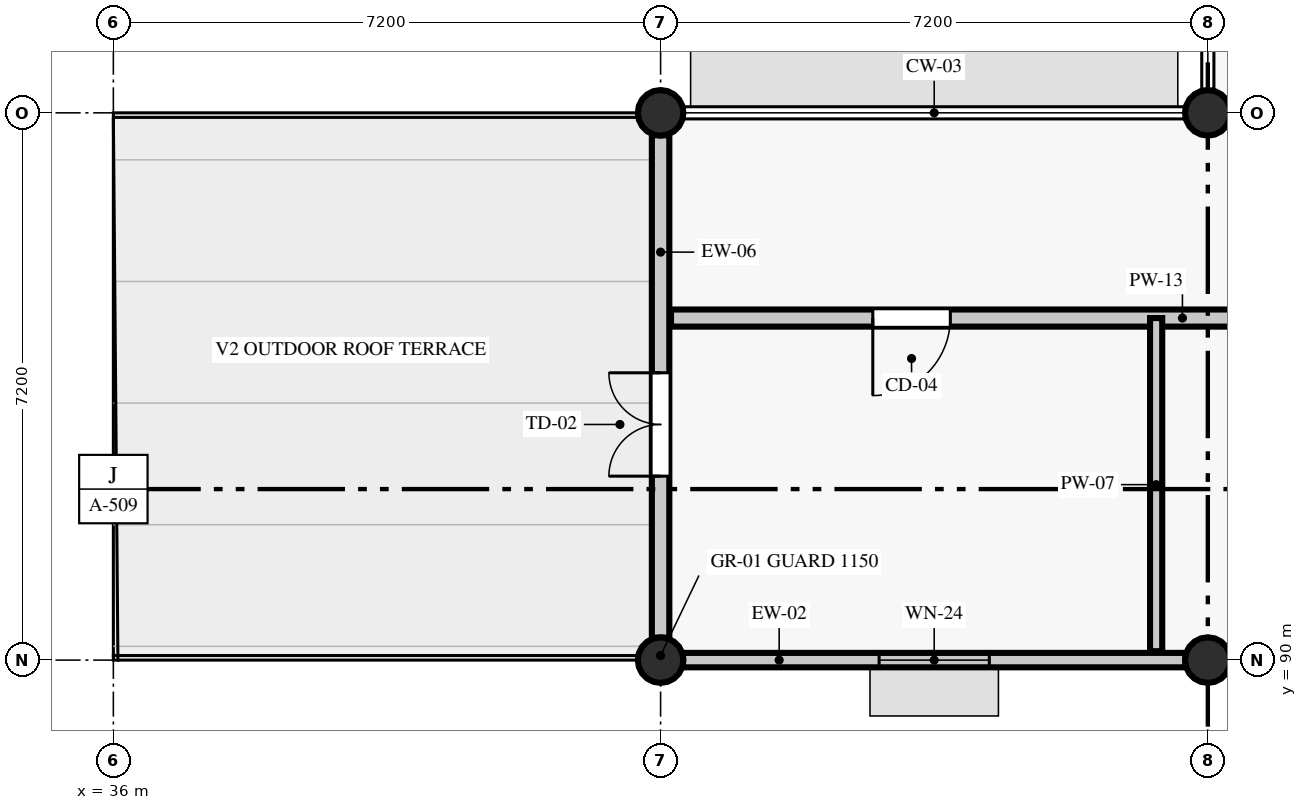
"""IFC4 building model, lengths in metres.
Left out: names, types, materials, properties, quantities, classifications, styles, units other than length and angle.
Written with IfcOpenShell. Run it as: python <this file> out.ifc"""

import sys

from ifc_helpers import new_model, si_unit, direction, frame, frame_2d, origin, origin_2d, place, context, subcontext, project, spatial, rectangle, circle, extrude, element, fill, save


model = new_model("IFC4")
c1 = context("Model", 3, precision=1e-05, world=origin(), true_north=direction((0.0, 1.0)))
c2 = subcontext(c1, "Body", "Model", "MODEL_VIEW")
j1 = project(units=[si_unit("LENGTHUNIT", "METRE"), si_unit("PLANEANGLEUNIT", "RADIAN")], contexts=[c1])
p1 = place(None, origin())
s1 = spatial("IfcSite", under=j1, at=p1, CompositionType="ELEMENT")
p2 = place(p1, origin())
s2 = spatial("IfcBuilding", under=s1, at=p2, CompositionType="ELEMENT")
p3 = place(p2, frame((0.0, 0.0, 9.6)))
s3 = spatial("IfcBuildingStorey", under=s2, at=p3, CompositionType="ELEMENT", Elevation=9.6)
for number, where, z_axis, x_axis in (
    (1, (43.2, 90.0, 0.0), (0.0, 0.0, 1.0), (1.0, 0.0, 0.0)),
    (2, (43.2, 97.2, 0.0), (0.0, 0.0, 1.0), (1.0, 0.0, 0.0)),
):
    element("IfcColumn", number, at=place(p3, frame(where, z_axis=z_axis, x_axis=x_axis)), inside=s3, PredefinedType="COLUMN", context=c2, shape_type="SweptSolid", body=[
        extrude(circle(Radius=0.3, at=origin_2d()), origin(), (0.0, 0.0, 1.0), 3.978),
    ])
for number, where, z_axis, x_axis in (
    (3, (50.4, 90.0, 0.0), (0.0, 0.0, 1.0), (1.0, 0.0, 0.0)),
    (4, (50.4, 97.2, 0.0), (0.0, 0.0, 1.0), (1.0, 0.0, 0.0)),
):
    element("IfcColumn", number, at=place(p3, frame(where, z_axis=z_axis, x_axis=x_axis)), inside=s3, PredefinedType="COLUMN", context=c2, shape_type="SweptSolid", body=[
        extrude(circle(Radius=0.3, at=origin_2d()), origin(), (0.0, 0.0, 1.0), 3.95),
    ])
p4 = place(p3, frame((43.495, 90.0, 0.0), z_axis=(0.0, 0.0, 1.0), x_axis=(1.0, 0.0, 0.0)))
e5 = element("IfcWall", 5, at=p4, inside=s3, PredefinedType="STANDARD", context=c2, shape_type="SweptSolid", body=[
    extrude(rectangle(XDim=6.61, YDim=0.19, at=frame_2d((3.305, 0.0))), origin(), (0.0, 0.0, 1.0), 3.328),
])
p5 = place(p4, frame((2.58, 0.0, 0.9)))
e6 = element("IfcOpeningElement", 6, at=p5, cuts=e5, PredefinedType="OPENING", context=c2, shape_type="SweptSolid", body=[
    extrude(rectangle(XDim=1.45, YDim=1.54, at=frame_2d((0.725, 0.77))), frame((0.0, 0.105, 0.0), z_axis=(0.0, -1.0, 0.0), x_axis=(1.0, 0.0, 0.0)), (0.0, 0.0, 1.0), 0.21),
])
p6 = place(p3, frame((43.2, 96.905, 0.0), z_axis=(0.0, 0.0, 1.0), x_axis=(0.0, -1.0, 0.0)))
e7 = element("IfcWall", 7, at=p6, inside=s3, PredefinedType="STANDARD", context=c2, shape_type="SweptSolid", body=[
    extrude(rectangle(XDim=6.61, YDim=0.23, at=frame_2d((3.305, 0.0))), origin(), (0.0, 0.0, 1.0), 3.328),
])
p7 = place(p6, frame((3.125, 0.0, 0.0)))
e8 = element("IfcOpeningElement", 8, at=p7, cuts=e7, PredefinedType="OPENING", context=c2, shape_type="SweptSolid", body=[
    extrude(rectangle(XDim=1.36, YDim=2.16, at=frame_2d((0.68, 1.08))), frame((0.0, 0.125, 0.0), z_axis=(0.0, -1.0, 0.0), x_axis=(1.0, 0.0, 0.0)), (0.0, 0.0, 1.0), 0.25),
])
p8 = place(p3, frame((43.337, 94.5, 0.0), z_axis=(0.0, 0.0, 1.0), x_axis=(1.0, 0.0, 0.0)))
e9 = element("IfcWall", 9, at=p8, inside=s3, PredefinedType="PARTITIONING", context=c2, shape_type="SweptSolid", body=[
    extrude(rectangle(XDim=14.243, YDim=0.225, at=frame_2d((7.122, 0.0))), origin(), (0.0, 0.0, 1.0), 3.428),
])
p9 = place(p8, frame((2.655, 0.0, 0.0)))
e10 = element("IfcOpeningElement", 10, at=p9, cuts=e9, PredefinedType="OPENING", context=c2, shape_type="SweptSolid", body=[
    extrude(rectangle(XDim=1.02, YDim=2.08, at=frame_2d((0.51, 1.04))), frame((0.0, 0.123, 0.0), z_axis=(0.0, -1.0, 0.0), x_axis=(1.0, 0.0, 0.0)), (0.0, 0.0, 1.0), 0.245),
])
p10 = place(p8, frame((9.783, 0.0, 0.0)))
e11 = element("IfcOpeningElement", 11, at=p10, cuts=e9, PredefinedType="OPENING", context=c2, shape_type="SweptSolid", body=[
    extrude(rectangle(XDim=1.06, YDim=2.08, at=frame_2d((0.53, 1.04))), frame((0.0, 0.123, 0.0), z_axis=(0.0, -1.0, 0.0), x_axis=(1.0, 0.0, 0.0)), (0.0, 0.0, 1.0), 0.245),
])
p11 = place(p3, frame((49.72, 90.117, 0.0), z_axis=(0.0, 0.0, 1.0), x_axis=(0.0, 1.0, 0.0)))
e12 = element("IfcWall", 12, at=p11, inside=s3, PredefinedType="PARTITIONING", context=c2, shape_type="SweptSolid", body=[
    extrude(rectangle(XDim=4.383, YDim=0.16, at=frame_2d((2.191, 0.0))), origin(), (0.0, 0.0, 1.0), 3.478),
])
p12 = place(p5, origin())
e13 = element("IfcWindow", 13, at=p12, inside=s3, PartitioningType="SINGLE_PANEL", PredefinedType="WINDOW", context=c2, shape_type="SweptSolid", body=[
    extrude(rectangle(XDim=1.45, YDim=1.54, at=frame_2d((0.725, 0.77))), frame((0.0, 0.03, 0.0), z_axis=(0.0, -1.0, 0.0), x_axis=(1.0, 0.0, 0.0)), (0.0, 0.0, 1.0), 0.06),
])
fill(e6, e13)
p13 = place(p7, frame((1.36, 0.0, 0.0), z_axis=(0.0, 0.0, 1.0), x_axis=(-1.0, 0.0, 0.0)))
e14 = element("IfcDoor", 14, at=p13, inside=s3, OperationType="DOUBLE_DOOR_SINGLE_SWING", PredefinedType="DOOR", context=c2, shape_type="SweptSolid", body=[
    extrude(rectangle(XDim=1.36, YDim=2.16, at=frame_2d((0.68, 1.08))), frame((0.0, 0.025, 0.0), z_axis=(0.0, -1.0, 0.0), x_axis=(1.0, 0.0, 0.0)), (0.0, 0.0, 1.0), 0.05),
])
fill(e8, e14)
p14 = place(p9, frame((1.02, 0.0, 0.0), z_axis=(0.0, 0.0, 1.0), x_axis=(-1.0, 0.0, 0.0)))
e15 = element("IfcDoor", 15, at=p14, inside=s3, OperationType="SINGLE_SWING_RIGHT", PredefinedType="DOOR", context=c2, shape_type="SweptSolid", body=[
    extrude(rectangle(XDim=1.02, YDim=2.08, at=frame_2d((0.51, 1.04))), frame((0.0, 0.025, 0.0), z_axis=(0.0, -1.0, 0.0), x_axis=(1.0, 0.0, 0.0)), (0.0, 0.0, 1.0), 0.05),
])
fill(e10, e15)
save(model, sys.argv[1])
